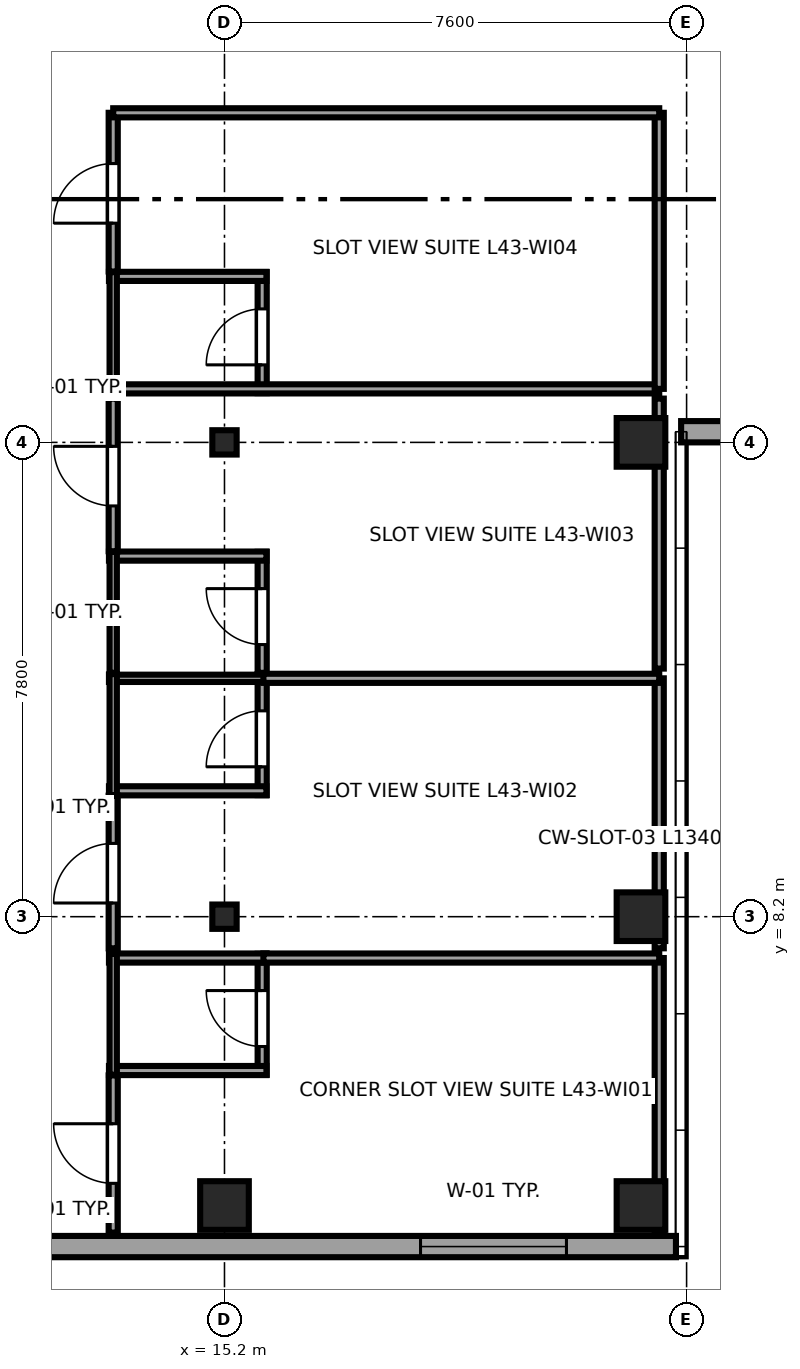
"""IFC4 building model, lengths in metres.
Left out: names, types, materials, properties, quantities, classifications, styles, units other than length and angle.
Written with IfcOpenShell. Run it as: python <this file> out.ifc"""

import sys

from ifc_helpers import new_model, si_unit, direction, frame, frame_2d, origin, origin_2d, place, context, subcontext, project, spatial, rectangle, i_section, extrude, source, transform, mapped, element, fill, save


model = new_model("IFC4")
c1 = context("Model", 3, precision=1e-05, world=origin(), true_north=direction((0.0, 1.0)))
c2 = subcontext(c1, "Body", "Model", "MODEL_VIEW")
j1 = project(units=[si_unit("LENGTHUNIT", "METRE"), si_unit("PLANEANGLEUNIT", "RADIAN")], contexts=[c1])
p1 = place(None, origin())
s1 = spatial("IfcSite", under=j1, at=p1, CompositionType="ELEMENT")
p2 = place(p1, origin())
s2 = spatial("IfcBuilding", under=s1, at=p2, CompositionType="ELEMENT")
p3 = place(p2, frame((0.0, 0.0, 164.8)))
s3 = spatial("IfcBuildingStorey", under=s2, at=p3, CompositionType="ELEMENT", Elevation=164.8)
m1 = source(origin(), c2, "Body", "SweptSolid", [
    extrude(rectangle(XDim=0.8, YDim=0.8, at=origin_2d()), origin(), (0.0, 0.0, 1.0), 3.55),
])
p4 = place(p3, frame((15.2, 3.45, 0.0), z_axis=(0.0, 0.0, 1.0), x_axis=(1.0, 0.0, 0.0)))
e1 = element("IfcColumn", 1, at=p4, inside=s3, PredefinedType="COLUMN", context=c2, shape_type="MappedRepresentation", body=[
    mapped(m1, transform((0.0, 0.0, 0.0), x_axis=(1.0, 0.0, 0.0), y_axis=(0.0, 1.0, 0.0), z_axis=(0.0, 0.0, 1.0), scale=1.0)),
])
m2 = source(origin(), c2, "Body", "SweptSolid", [
    extrude(i_section(OverallWidth=0.4, OverallDepth=0.4, WebThickness=0.02, FlangeThickness=0.035, at=origin_2d()), origin(), (0.0, 0.0, 1.0), 3.55),
])
for number, where, z_axis, x_axis in (
    (2, (15.2, 8.2, 0.0), (0.0, 0.0, 1.0), (1.0, 0.0, 0.0)),
    (3, (15.2, 16.0, 0.0), (0.0, 0.0, 1.0), (1.0, 0.0, 0.0)),
):
    element("IfcColumn", number, at=place(p3, frame(where, z_axis=z_axis, x_axis=x_axis)), inside=s3, PredefinedType="COLUMN", context=c2, shape_type="MappedRepresentation", body=[
        mapped(m2, transform((0.0, 0.0, 0.0), x_axis=(1.0, 0.0, 0.0), y_axis=(0.0, 1.0, 0.0), z_axis=(0.0, 0.0, 1.0), scale=1.0)),
    ])
for number, where, z_axis, x_axis in (
    (4, (22.05, 3.45, 0.0), (0.0, 0.0, 1.0), (1.0, 0.0, 0.0)),
    (5, (22.05, 8.2, 0.0), (0.0, 0.0, 1.0), (1.0, 0.0, 0.0)),
    (6, (22.05, 16.0, 0.0), (0.0, 0.0, 1.0), (1.0, 0.0, 0.0)),
):
    element("IfcColumn", number, at=place(p3, frame(where, z_axis=z_axis, x_axis=x_axis)), inside=s3, PredefinedType="COLUMN", context=c2, shape_type="MappedRepresentation", body=[
        mapped(m1, transform((0.0, 0.0, 0.0), x_axis=(1.0, 0.0, 0.0), y_axis=(0.0, 1.0, 0.0), z_axis=(0.0, 0.0, 1.0), scale=1.0)),
    ])
p5 = place(p3, frame((7.017, 2.775, 0.0), z_axis=(0.0, 0.0, 1.0), x_axis=(1.0, 0.0, 0.0)))
e7 = element("IfcWall", 7, at=p5, inside=s3, PredefinedType="SOLIDWALL", context=c2, shape_type="SweptSolid", body=[
    extrude(rectangle(XDim=15.608, YDim=0.35, at=frame_2d((7.804, 0.0))), origin(), (0.0, 0.0, 1.0), 3.37),
])
p6 = place(p5, frame((1.251, 0.0, 0.68)))
e8 = element("IfcOpeningElement", 8, at=p6, cuts=e7, PredefinedType="OPENING", context=c2, shape_type="SweptSolid", body=[
    extrude(rectangle(XDim=2.4, YDim=1.9, at=frame_2d((1.2, 0.95))), frame((0.0, 0.185, 0.0), z_axis=(0.0, -1.0, 0.0), x_axis=(1.0, 0.0, 0.0)), (0.0, 0.0, 1.0), 0.37),
])
p7 = place(p5, frame((11.407, 0.0, 0.68)))
e9 = element("IfcOpeningElement", 9, at=p7, cuts=e7, PredefinedType="OPENING", context=c2, shape_type="SweptSolid", body=[
    extrude(rectangle(XDim=2.4, YDim=1.9, at=frame_2d((1.2, 0.95))), frame((0.0, 0.185, 0.0), z_axis=(0.0, -1.0, 0.0), x_axis=(1.0, 0.0, 0.0)), (0.0, 0.0, 1.0), 0.37),
])
p8 = place(p3, frame((22.71, 16.175, 0.0), z_axis=(0.0, 0.0, 1.0), x_axis=(1.0, 0.0, 0.0)))
e10 = element("IfcWall", 10, at=p8, inside=s3, PredefinedType="SOLIDWALL", context=c2, shape_type="SweptSolid", body=[
    extrude(rectangle(XDim=11.58, YDim=0.35, at=frame_2d((5.79, 0.0))), origin(), (0.0, 0.0, 1.0), 2.758),
])
p9 = place(p8, frame((1.995, 0.0, 0.68)))
e11 = element("IfcOpeningElement", 11, at=p9, cuts=e10, PredefinedType="OPENING", context=c2, shape_type="SweptSolid", body=[
    extrude(rectangle(XDim=2.4, YDim=1.9, at=frame_2d((1.2, 0.95))), frame((0.0, 0.185, 0.0), z_axis=(0.0, -1.0, 0.0), x_axis=(1.0, 0.0, 0.0)), (0.0, 0.0, 1.0), 0.37),
])
p10 = place(p8, frame((7.185, 0.0, 0.68)))
e12 = element("IfcOpeningElement", 12, at=p10, cuts=e10, PredefinedType="OPENING", context=c2, shape_type="SweptSolid", body=[
    extrude(rectangle(XDim=2.4, YDim=1.9, at=frame_2d((1.2, 0.95))), frame((0.0, 0.185, 0.0), z_axis=(0.0, -1.0, 0.0), x_axis=(1.0, 0.0, 0.0)), (0.0, 0.0, 1.0), 0.37),
])
p11 = place(p3, frame((15.82, 5.6, 0.0), z_axis=(0.0, 0.0, 1.0), x_axis=(0.0, 1.0, 0.0)))
e13 = element("IfcWall", 13, at=p11, inside=s3, PredefinedType="PARTITIONING", context=c2, shape_type="SweptSolid", body=[
    extrude(rectangle(XDim=1.99, YDim=0.15, at=frame_2d((0.995, 0.0))), origin(), (0.0, 0.0, 1.0), 3.37),
])
p12 = place(p11, frame((0.465, 0.0, 0.0)))
e14 = element("IfcOpeningElement", 14, at=p12, cuts=e13, PredefinedType="OPENING", context=c2, shape_type="SweptSolid", body=[
    extrude(rectangle(XDim=0.92, YDim=2.01, at=frame_2d((0.46, 1.005))), frame((0.0, 0.085, 0.0), z_axis=(0.0, -1.0, 0.0), x_axis=(1.0, 0.0, 0.0)), (0.0, 0.0, 1.0), 0.17),
])
for number, where, z_axis, x_axis in (
    (15, (13.3, 5.67, 0.0), (0.0, 0.0, 1.0), (1.0, 0.0, 0.0)),
    (16, (13.3, 7.52, 0.0), (0.0, 0.0, 1.0), (1.0, 0.0, 0.0)),
):
    element("IfcWall", number, at=place(p3, frame(where, z_axis=z_axis, x_axis=x_axis)), inside=s3, PredefinedType="PARTITIONING", context=c2, shape_type="SweptSolid", body=[
        extrude(rectangle(XDim=2.59, YDim=0.15, at=frame_2d((1.295, 0.0))), origin(), (0.0, 0.0, 1.0), 3.37),
    ])
p13 = place(p3, frame((13.37, 5.6, 0.0), z_axis=(0.0, 0.0, 1.0), x_axis=(0.0, 1.0, 0.0)))
e17 = element("IfcWall", 17, at=p13, inside=s3, PredefinedType="PLUMBINGWALL", context=c2, shape_type="SweptSolid", body=[
    extrude(rectangle(XDim=1.99, YDim=0.12, at=frame_2d((0.995, 0.0))), origin(), (0.0, 0.0, 1.0), 3.37),
])
p14 = place(p3, frame((15.82, 10.2, 0.0), z_axis=(0.0, 0.0, 1.0), x_axis=(0.0, 1.0, 0.0)))
e18 = element("IfcWall", 18, at=p14, inside=s3, PredefinedType="PARTITIONING", context=c2, shape_type="SweptSolid", body=[
    extrude(rectangle(XDim=1.99, YDim=0.15, at=frame_2d((0.995, 0.0))), origin(), (0.0, 0.0, 1.0), 3.37),
])
p15 = place(p14, frame((0.465, 0.0, 0.0)))
e19 = element("IfcOpeningElement", 19, at=p15, cuts=e18, PredefinedType="OPENING", context=c2, shape_type="SweptSolid", body=[
    extrude(rectangle(XDim=0.92, YDim=2.01, at=frame_2d((0.46, 1.005))), frame((0.0, 0.085, 0.0), z_axis=(0.0, -1.0, 0.0), x_axis=(1.0, 0.0, 0.0)), (0.0, 0.0, 1.0), 0.17),
])
p16 = place(p3, frame((13.3, 10.27, 0.0), z_axis=(0.0, 0.0, 1.0), x_axis=(1.0, 0.0, 0.0)))
e20 = element("IfcWall", 20, at=p16, inside=s3, PredefinedType="PARTITIONING", context=c2, shape_type="SweptSolid", body=[
    extrude(rectangle(XDim=2.59, YDim=0.15, at=frame_2d((1.295, 0.0))), origin(), (0.0, 0.0, 1.0), 3.37),
])
p17 = place(p3, frame((13.3, 12.12, 0.0), z_axis=(0.0, 0.0, 1.0), x_axis=(1.0, 0.0, 0.0)))
e21 = element("IfcWall", 21, at=p17, inside=s3, PredefinedType="PLUMBINGWALL", context=c2, shape_type="SweptSolid", body=[
    extrude(rectangle(XDim=2.59, YDim=0.12, at=frame_2d((1.295, 0.0))), origin(), (0.0, 0.0, 1.0), 3.37),
])
p18 = place(p3, frame((13.37, 10.2, 0.0), z_axis=(0.0, 0.0, 1.0), x_axis=(0.0, 1.0, 0.0)))
e22 = element("IfcWall", 22, at=p18, inside=s3, PredefinedType="PLUMBINGWALL", context=c2, shape_type="SweptSolid", body=[
    extrude(rectangle(XDim=1.99, YDim=0.12, at=frame_2d((0.995, 0.0))), origin(), (0.0, 0.0, 1.0), 3.37),
])
p19 = place(p3, frame((15.82, 12.21, 0.0), z_axis=(0.0, 0.0, 1.0), x_axis=(0.0, 1.0, 0.0)))
e23 = element("IfcWall", 23, at=p19, inside=s3, PredefinedType="PARTITIONING", context=c2, shape_type="SweptSolid", body=[
    extrude(rectangle(XDim=1.99, YDim=0.15, at=frame_2d((0.995, 0.0))), origin(), (0.0, 0.0, 1.0), 3.37),
])
p20 = place(p19, frame((0.465, 0.0, 0.0)))
e24 = element("IfcOpeningElement", 24, at=p20, cuts=e23, PredefinedType="OPENING", context=c2, shape_type="SweptSolid", body=[
    extrude(rectangle(XDim=0.92, YDim=2.01, at=frame_2d((0.46, 1.005))), frame((0.0, 0.085, 0.0), z_axis=(0.0, -1.0, 0.0), x_axis=(1.0, 0.0, 0.0)), (0.0, 0.0, 1.0), 0.17),
])
p21 = place(p3, frame((13.3, 14.13, 0.0), z_axis=(0.0, 0.0, 1.0), x_axis=(1.0, 0.0, 0.0)))
e25 = element("IfcWall", 25, at=p21, inside=s3, PredefinedType="PARTITIONING", context=c2, shape_type="SweptSolid", body=[
    extrude(rectangle(XDim=2.59, YDim=0.15, at=frame_2d((1.295, 0.0))), origin(), (0.0, 0.0, 1.0), 3.37),
])
p22 = place(p3, frame((13.37, 12.21, 0.0), z_axis=(0.0, 0.0, 1.0), x_axis=(0.0, 1.0, 0.0)))
e26 = element("IfcWall", 26, at=p22, inside=s3, PredefinedType="PLUMBINGWALL", context=c2, shape_type="SweptSolid", body=[
    extrude(rectangle(XDim=1.99, YDim=0.12, at=frame_2d((0.995, 0.0))), origin(), (0.0, 0.0, 1.0), 3.37),
])
p23 = place(p3, frame((15.82, 16.81, 0.0), z_axis=(0.0, 0.0, 1.0), x_axis=(0.0, 1.0, 0.0)))
e27 = element("IfcWall", 27, at=p23, inside=s3, PredefinedType="PARTITIONING", context=c2, shape_type="SweptSolid", body=[
    extrude(rectangle(XDim=1.99, YDim=0.15, at=frame_2d((0.995, 0.0))), origin(), (0.0, 0.0, 1.0), 3.37),
])
p24 = place(p23, frame((0.465, 0.0, 0.0)))
e28 = element("IfcOpeningElement", 28, at=p24, cuts=e27, PredefinedType="OPENING", context=c2, shape_type="SweptSolid", body=[
    extrude(rectangle(XDim=0.92, YDim=2.01, at=frame_2d((0.46, 1.005))), frame((0.0, 0.085, 0.0), z_axis=(0.0, -1.0, 0.0), x_axis=(1.0, 0.0, 0.0)), (0.0, 0.0, 1.0), 0.17),
])
p25 = place(p3, frame((13.3, 16.88, 0.0), z_axis=(0.0, 0.0, 1.0), x_axis=(1.0, 0.0, 0.0)))
e29 = element("IfcWall", 29, at=p25, inside=s3, PredefinedType="PARTITIONING", context=c2, shape_type="SweptSolid", body=[
    extrude(rectangle(XDim=9.05, YDim=0.15, at=frame_2d((4.525, 0.0))), origin(), (0.0, 0.0, 1.0), 3.37),
])
p26 = place(p3, frame((13.3, 18.73, 0.0), z_axis=(0.0, 0.0, 1.0), x_axis=(1.0, 0.0, 0.0)))
e30 = element("IfcWall", 30, at=p26, inside=s3, PredefinedType="PARTITIONING", context=c2, shape_type="SweptSolid", body=[
    extrude(rectangle(XDim=2.59, YDim=0.15, at=frame_2d((1.295, 0.0))), origin(), (0.0, 0.0, 1.0), 3.37),
])
p27 = place(p3, frame((13.37, 16.81, 0.0), z_axis=(0.0, 0.0, 1.0), x_axis=(0.0, 1.0, 0.0)))
e31 = element("IfcWall", 31, at=p27, inside=s3, PredefinedType="PLUMBINGWALL", context=c2, shape_type="SweptSolid", body=[
    extrude(rectangle(XDim=1.99, YDim=0.12, at=frame_2d((0.995, 0.0))), origin(), (0.0, 0.0, 1.0), 3.37),
])
p28 = place(p3, frame((13.37, 3.005, 0.0), z_axis=(0.0, 0.0, 1.0), x_axis=(0.0, 1.0, 0.0)))
e32 = element("IfcWall", 32, at=p28, inside=s3, PredefinedType="PARTITIONING", context=c2, shape_type="SweptSolid", body=[
    extrude(rectangle(XDim=2.585, YDim=0.15, at=frame_2d((1.292, 0.0))), origin(), (0.0, 0.0, 1.0), 3.37),
])
p29 = place(p28, frame((0.81, 0.0, 0.0)))
e33 = element("IfcOpeningElement", 33, at=p29, cuts=e32, PredefinedType="OPENING", context=c2, shape_type="SweptSolid", body=[
    extrude(rectangle(XDim=0.98, YDim=2.12, at=frame_2d((0.49, 1.06))), frame((0.0, 0.085, 0.0), z_axis=(0.0, -1.0, 0.0), x_axis=(1.0, 0.0, 0.0)), (0.0, 0.0, 1.0), 0.17),
])
p30 = place(p3, frame((22.35, 3.005, 0.0), z_axis=(0.0, 0.0, 1.0), x_axis=(0.0, 1.0, 0.0)))
e34 = element("IfcWall", 34, at=p30, inside=s3, PredefinedType="PARTITIONING", context=c2, shape_type="SweptSolid", body=[
    extrude(rectangle(XDim=4.515, YDim=0.15, at=frame_2d((2.258, 0.0))), origin(), (0.0, 0.0, 1.0), 3.37),
])
p31 = place(p3, frame((15.84, 7.52, 0.0), z_axis=(0.0, 0.0, 1.0), x_axis=(1.0, 0.0, 0.0)))
e35 = element("IfcWall", 35, at=p31, inside=s3, PredefinedType="PARTITIONING", context=c2, shape_type="SweptSolid", body=[
    extrude(rectangle(XDim=6.51, YDim=0.15, at=frame_2d((3.255, 0.0))), origin(), (0.0, 0.0, 1.0), 3.37),
])
p32 = place(p3, frame((13.37, 7.68, 0.0), z_axis=(0.0, 0.0, 1.0), x_axis=(0.0, 1.0, 0.0)))
e36 = element("IfcWall", 36, at=p32, inside=s3, PredefinedType="PARTITIONING", context=c2, shape_type="SweptSolid", body=[
    extrude(rectangle(XDim=2.51, YDim=0.15, at=frame_2d((1.255, 0.0))), origin(), (0.0, 0.0, 1.0), 3.37),
])
p33 = place(p32, frame((0.745, 0.0, 0.0)))
e37 = element("IfcOpeningElement", 37, at=p33, cuts=e36, PredefinedType="OPENING", context=c2, shape_type="SweptSolid", body=[
    extrude(rectangle(XDim=0.98, YDim=2.12, at=frame_2d((0.49, 1.06))), frame((0.0, 0.085, 0.0), z_axis=(0.0, -1.0, 0.0), x_axis=(1.0, 0.0, 0.0)), (0.0, 0.0, 1.0), 0.17),
])
p34 = place(p3, frame((22.35, 7.68, 0.0), z_axis=(0.0, 0.0, 1.0), x_axis=(0.0, 1.0, 0.0)))
e38 = element("IfcWall", 38, at=p34, inside=s3, PredefinedType="PARTITIONING", context=c2, shape_type="SweptSolid", body=[
    extrude(rectangle(XDim=4.44, YDim=0.15, at=frame_2d((2.22, 0.0))), origin(), (0.0, 0.0, 1.0), 3.37),
])
p35 = place(p3, frame((15.84, 12.12, 0.0), z_axis=(0.0, 0.0, 1.0), x_axis=(1.0, 0.0, 0.0)))
e39 = element("IfcWall", 39, at=p35, inside=s3, PredefinedType="PARTITIONING", context=c2, shape_type="SweptSolid", body=[
    extrude(rectangle(XDim=6.51, YDim=0.15, at=frame_2d((3.255, 0.0))), origin(), (0.0, 0.0, 1.0), 3.37),
])
p36 = place(p3, frame((13.37, 14.21, 0.0), z_axis=(0.0, 0.0, 1.0), x_axis=(0.0, 1.0, 0.0)))
e40 = element("IfcWall", 40, at=p36, inside=s3, PredefinedType="PARTITIONING", context=c2, shape_type="SweptSolid", body=[
    extrude(rectangle(XDim=2.51, YDim=0.15, at=frame_2d((1.255, 0.0))), origin(), (0.0, 0.0, 1.0), 3.37),
])
p37 = place(p36, frame((0.745, 0.0, 0.0)))
e41 = element("IfcOpeningElement", 41, at=p37, cuts=e40, PredefinedType="OPENING", context=c2, shape_type="SweptSolid", body=[
    extrude(rectangle(XDim=0.98, YDim=2.12, at=frame_2d((0.49, 1.06))), frame((0.0, 0.085, 0.0), z_axis=(0.0, -1.0, 0.0), x_axis=(1.0, 0.0, 0.0)), (0.0, 0.0, 1.0), 0.17),
])
p38 = place(p3, frame((22.35, 12.28, 0.0), z_axis=(0.0, 0.0, 1.0), x_axis=(0.0, 1.0, 0.0)))
e42 = element("IfcWall", 42, at=p38, inside=s3, PredefinedType="PARTITIONING", context=c2, shape_type="SweptSolid", body=[
    extrude(rectangle(XDim=4.44, YDim=0.15, at=frame_2d((2.22, 0.0))), origin(), (0.0, 0.0, 1.0), 3.37),
])
p39 = place(p3, frame((13.37, 18.81, 0.0), z_axis=(0.0, 0.0, 1.0), x_axis=(0.0, 1.0, 0.0)))
e43 = element("IfcWall", 43, at=p39, inside=s3, PredefinedType="PARTITIONING", context=c2, shape_type="SweptSolid", body=[
    extrude(rectangle(XDim=2.61, YDim=0.15, at=frame_2d((1.305, 0.0))), origin(), (0.0, 0.0, 1.0), 3.37),
])
p40 = place(p39, frame((0.795, 0.0, 0.0)))
e44 = element("IfcOpeningElement", 44, at=p40, cuts=e43, PredefinedType="OPENING", context=c2, shape_type="SweptSolid", body=[
    extrude(rectangle(XDim=0.98, YDim=2.12, at=frame_2d((0.49, 1.06))), frame((0.0, 0.085, 0.0), z_axis=(0.0, -1.0, 0.0), x_axis=(1.0, 0.0, 0.0)), (0.0, 0.0, 1.0), 0.17),
])
p41 = place(p3, frame((22.35, 16.88, 0.0), z_axis=(0.0, 0.0, 1.0), x_axis=(0.0, 1.0, 0.0)))
e45 = element("IfcWall", 45, at=p41, inside=s3, PredefinedType="PARTITIONING", context=c2, shape_type="SweptSolid", body=[
    extrude(rectangle(XDim=4.54, YDim=0.15, at=frame_2d((2.27, 0.0))), origin(), (0.0, 0.0, 1.0), 3.37),
])
p42 = place(p3, frame((13.37, 21.42, 0.0), z_axis=(0.0, 0.0, 1.0), x_axis=(1.0, 0.0, 0.0)))
e46 = element("IfcWall", 46, at=p42, inside=s3, PredefinedType="PARTITIONING", context=c2, shape_type="SweptSolid", body=[
    extrude(rectangle(XDim=8.98, YDim=0.15, at=frame_2d((4.49, 0.0))), origin(), (0.0, 0.0, 1.0), 3.37),
])
m3 = source(origin(), c2, "Body", "SweptSolid", [
    extrude(rectangle(XDim=2.4, YDim=1.9, at=frame_2d((1.2, 0.95))), frame((0.0, 0.09, 0.0), z_axis=(0.0, -1.0, 0.0), x_axis=(1.0, 0.0, 0.0)), (0.0, 0.0, 1.0), 0.06),
])
p43 = place(p7, origin())
e47 = element("IfcWindow", 47, at=p43, inside=s3, PartitioningType="TRIPLE_PANEL_HORIZONTAL", PredefinedType="WINDOW", context=c2, shape_type="MappedRepresentation", body=[
    mapped(m3, transform((0.0, 0.0, 0.0), x_axis=(1.0, 0.0, 0.0), y_axis=(0.0, 1.0, 0.0), z_axis=(0.0, 0.0, 1.0), scale=1.0)),
])
fill(e9, e47)
m4 = source(origin(), c2, "Body", "SweptSolid", [
    extrude(rectangle(XDim=0.92, YDim=2.01, at=frame_2d((0.46, 1.005))), frame((0.0, 0.025, 0.0), z_axis=(0.0, -1.0, 0.0), x_axis=(1.0, 0.0, 0.0)), (0.0, 0.0, 1.0), 0.05),
])
p44 = place(p12, origin())
e48 = element("IfcDoor", 48, at=p44, inside=s3, OperationType="SINGLE_SWING_RIGHT", PredefinedType="DOOR", context=c2, shape_type="MappedRepresentation", body=[
    mapped(m4, transform((0.0, 0.0, 0.0), x_axis=(1.0, 0.0, 0.0), y_axis=(0.0, 1.0, 0.0), z_axis=(0.0, 0.0, 1.0), scale=1.0)),
])
fill(e14, e48)
p45 = place(p15, origin())
e49 = element("IfcDoor", 49, at=p45, inside=s3, OperationType="SINGLE_SWING_LEFT", PredefinedType="DOOR", context=c2, shape_type="MappedRepresentation", body=[
    mapped(m4, transform((0.0, 0.0, 0.0), x_axis=(1.0, 0.0, 0.0), y_axis=(0.0, 1.0, 0.0), z_axis=(0.0, 0.0, 1.0), scale=1.0)),
])
fill(e19, e49)
p46 = place(p20, origin())
e50 = element("IfcDoor", 50, at=p46, inside=s3, OperationType="SINGLE_SWING_RIGHT", PredefinedType="DOOR", context=c2, shape_type="MappedRepresentation", body=[
    mapped(m4, transform((0.0, 0.0, 0.0), x_axis=(1.0, 0.0, 0.0), y_axis=(0.0, 1.0, 0.0), z_axis=(0.0, 0.0, 1.0), scale=1.0)),
])
fill(e24, e50)
p47 = place(p24, origin())
e51 = element("IfcDoor", 51, at=p47, inside=s3, OperationType="SINGLE_SWING_LEFT", PredefinedType="DOOR", context=c2, shape_type="MappedRepresentation", body=[
    mapped(m4, transform((0.0, 0.0, 0.0), x_axis=(1.0, 0.0, 0.0), y_axis=(0.0, 1.0, 0.0), z_axis=(0.0, 0.0, 1.0), scale=1.0)),
])
fill(e28, e51)
m5 = source(origin(), c2, "Body", "SweptSolid", [
    extrude(rectangle(XDim=0.98, YDim=2.12, at=frame_2d((0.49, 1.06))), frame((0.0, 0.025, 0.0), z_axis=(0.0, -1.0, 0.0), x_axis=(1.0, 0.0, 0.0)), (0.0, 0.0, 1.0), 0.05),
])
p48 = place(p29, origin())
e52 = element("IfcDoor", 52, at=p48, inside=s3, OperationType="SINGLE_SWING_RIGHT", PredefinedType="DOOR", context=c2, shape_type="MappedRepresentation", body=[
    mapped(m5, transform((0.0, 0.0, 0.0), x_axis=(1.0, 0.0, 0.0), y_axis=(0.0, 1.0, 0.0), z_axis=(0.0, 0.0, 1.0), scale=1.0)),
])
fill(e33, e52)
p49 = place(p33, origin())
e53 = element("IfcDoor", 53, at=p49, inside=s3, OperationType="SINGLE_SWING_LEFT", PredefinedType="DOOR", context=c2, shape_type="MappedRepresentation", body=[
    mapped(m5, transform((0.0, 0.0, 0.0), x_axis=(1.0, 0.0, 0.0), y_axis=(0.0, 1.0, 0.0), z_axis=(0.0, 0.0, 1.0), scale=1.0)),
])
fill(e37, e53)
p50 = place(p37, origin())
e54 = element("IfcDoor", 54, at=p50, inside=s3, OperationType="SINGLE_SWING_RIGHT", PredefinedType="DOOR", context=c2, shape_type="MappedRepresentation", body=[
    mapped(m5, transform((0.0, 0.0, 0.0), x_axis=(1.0, 0.0, 0.0), y_axis=(0.0, 1.0, 0.0), z_axis=(0.0, 0.0, 1.0), scale=1.0)),
])
fill(e41, e54)
p51 = place(p40, origin())
e55 = element("IfcDoor", 55, at=p51, inside=s3, OperationType="SINGLE_SWING_LEFT", PredefinedType="DOOR", context=c2, shape_type="MappedRepresentation", body=[
    mapped(m5, transform((0.0, 0.0, 0.0), x_axis=(1.0, 0.0, 0.0), y_axis=(0.0, 1.0, 0.0), z_axis=(0.0, 0.0, 1.0), scale=1.0)),
])
fill(e44, e55)
save(model, sys.argv[1])
